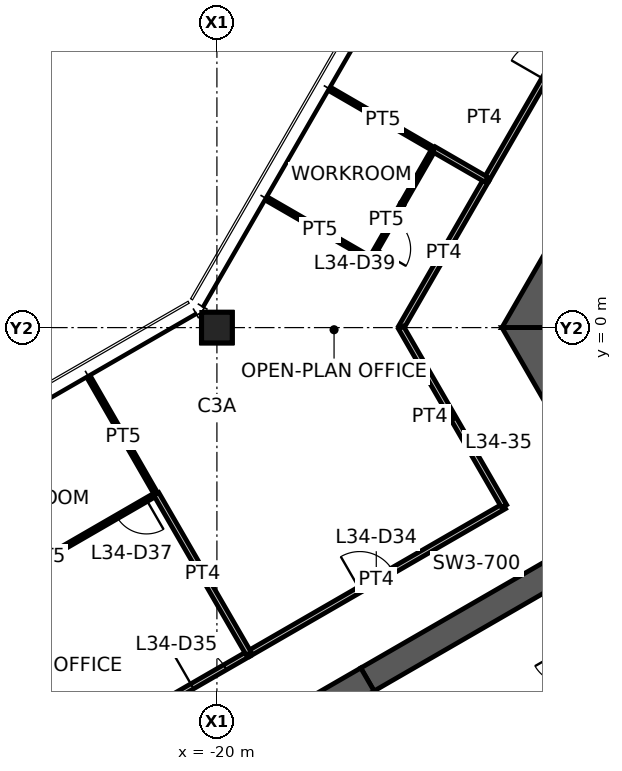
"""IFC4 building model, lengths in metres.
Left out: names, types, materials, properties, quantities, classifications, styles, units other than length and angle.
Written with IfcOpenShell. Run it as: python <this file> out.ifc"""

import sys

from ifc_helpers import new_model, si_unit, direction, frame, frame_2d, origin, origin_2d, place, context, subcontext, project, spatial, polyline, rectangle, hollow_rectangle, outline, extrude, element, fill, save


model = new_model("IFC4")
c1 = context("Model", 3, precision=1e-05, world=origin(), true_north=direction((0.0, 1.0)))
c2 = subcontext(c1, "Body", "Model", "MODEL_VIEW")
j1 = project(units=[si_unit("LENGTHUNIT", "METRE"), si_unit("PLANEANGLEUNIT", "RADIAN")], contexts=[c1])
p1 = place(None, origin())
s1 = spatial("IfcSite", under=j1, at=p1, CompositionType="ELEMENT")
p2 = place(p1, origin())
s2 = spatial("IfcBuilding", under=s1, at=p2, CompositionType="ELEMENT")
p3 = place(p2, frame((0.0, 0.0, 137.0)))
s3 = spatial("IfcBuildingStorey", under=s2, at=p3, CompositionType="ELEMENT", Elevation=137.0)
p4 = place(p3, frame((-20.0, 0.0, 0.0), z_axis=(0.0, 0.0, 1.0), x_axis=(1.0, 0.0, 0.0)))
e1 = element("IfcColumn", 1, at=p4, inside=s3, PredefinedType="COLUMN", context=c2, shape_type="SweptSolid", body=[
    extrude(hollow_rectangle(XDim=0.8, YDim=0.8, WallThickness=0.045, at=origin_2d()), origin(), (0.0, 0.0, 1.0), 3.9),
])
p5 = place(p3, frame((-5.961, 10.325, 0.0), z_axis=(0.0, 0.0, 1.0), x_axis=(-0.500004296715, -0.866022923061, 0.0)))
e2 = element("IfcWall", 2, at=p5, inside=s3, PredefinedType="SHEAR", context=c2, shape_type="SweptSolid", body=[
    extrude(outline(polyline([(-0.289, -0.5), (4.494, -0.5), (5.494, -0.5), (12.211, -0.5), (11.634, 0.5), (5.494, 0.5), (4.494, 0.5), (0.289, 0.5), (-0.289, -0.5)])), origin(), (0.0, 0.0, 1.0), 3.9),
])
p6 = place(p5, frame((4.494, 0.0, 0.0)))
e3 = element("IfcOpeningElement", 3, at=p6, cuts=e2, PredefinedType="OPENING", context=c2, shape_type="SweptSolid", body=[
    extrude(rectangle(XDim=1.0, YDim=2.1, at=frame_2d((0.5, 1.05))), frame((0.0, 0.51, 0.0), z_axis=(0.0, -1.0, 0.0), x_axis=(1.0, 0.0, 0.0)), (0.0, 0.0, 1.0), 1.02),
])
p7 = place(p3, frame((-11.922, 0.0, 0.0), z_axis=(0.0, 0.0, 1.0), x_axis=(0.500004296715, -0.866022923061, 0.0)))
e4 = element("IfcWall", 4, at=p7, inside=s3, PredefinedType="SHEAR", context=c2, shape_type="SweptSolid", body=[
    extrude(outline(polyline([(-0.289, -0.5), (6.331, -0.5), (7.131, -0.5), (12.211, -0.5), (11.634, 0.5), (7.131, 0.5), (6.331, 0.5), (0.289, 0.5), (-0.289, -0.5)])), origin(), (0.0, 0.0, 1.0), 3.9),
])
p8 = place(p7, frame((6.331, 0.0, 0.0)))
e5 = element("IfcOpeningElement", 5, at=p8, cuts=e4, PredefinedType="OPENING", context=c2, shape_type="SweptSolid", body=[
    extrude(rectangle(XDim=0.8, YDim=2.1, at=frame_2d((0.4, 1.05))), frame((0.0, 0.51, 0.0), z_axis=(0.0, -1.0, 0.0), x_axis=(1.0, 0.0, 0.0)), (0.0, 0.0, 1.0), 1.02),
])
p9 = place(p3, frame((-9.375, -5.413, 0.0), z_axis=(0.0, 0.0, 1.0), x_axis=(-0.866032377459, -0.499987921047, 0.0)))
e6 = element("IfcWall", 6, at=p9, inside=s3, PredefinedType="SHEAR", context=c2, shape_type="SweptSolid", body=[
    extrude(rectangle(XDim=7.696, YDim=0.7, at=frame_2d((3.848, 0.0))), origin(), (0.0, 0.0, 1.0), 3.9),
])
p10 = place(p9, frame((0.9, 0.0, 0.0)))
e7 = element("IfcOpeningElement", 7, at=p10, cuts=e6, PredefinedType="OPENING", context=c2, shape_type="SweptSolid", body=[
    extrude(rectangle(XDim=1.0, YDim=2.1, at=frame_2d((0.5, 1.05))), frame((0.0, 0.36, 0.0), z_axis=(0.0, -1.0, 0.0), x_axis=(1.0, 0.0, 0.0)), (0.0, 0.0, 1.0), 0.72),
])
p11 = place(p3, frame((-16.039, -9.26, 0.0), z_axis=(0.0, 0.0, 1.0), x_axis=(-0.866024837091, -0.50000098154, 0.0)))
e8 = element("IfcWall", 8, at=p11, inside=s3, PredefinedType="SHEAR", context=c2, shape_type="SweptSolid", body=[
    extrude(rectangle(XDim=13.0, YDim=0.7, at=frame_2d((6.5, 0.0))), origin(), (0.0, 0.0, 1.0), 3.9),
])
p12 = place(p3, frame((-19.171, -8.586, 0.0), z_axis=(0.0, 0.0, 1.0), x_axis=(0.866007176269, 0.500031569654, 0.0)))
e9 = element("IfcWall", 9, at=p12, inside=s3, PredefinedType="PARTITIONING", context=c2, shape_type="SweptSolid", body=[
    extrude(rectangle(XDim=7.771, YDim=0.15, at=frame_2d((3.885, 0.0))), origin(), (0.0, 0.0, 1.0), 2.95),
])
p13 = place(p12, frame((3.385, 0.0, 0.0)))
e10 = element("IfcOpeningElement", 10, at=p13, cuts=e9, PredefinedType="OPENING", context=c2, shape_type="SweptSolid", body=[
    extrude(rectangle(XDim=1.0, YDim=2.1, at=frame_2d((0.5, 1.05))), frame((0.0, 0.085, 0.0), z_axis=(0.0, -1.0, 0.0), x_axis=(1.0, 0.0, 0.0)), (0.0, 0.0, 1.0), 0.17),
])
p14 = place(p3, frame((-15.156, 0.0, 0.0), z_axis=(0.0, 0.0, 1.0), x_axis=(0.500014848696, 0.866016830716, 0.0)))
e11 = element("IfcWall", 11, at=p14, inside=s3, PredefinedType="PARTITIONING", context=c2, shape_type="SweptSolid", body=[
    extrude(rectangle(XDim=4.505, YDim=0.15, at=frame_2d((2.252, 0.0))), origin(), (0.0, 0.0, 1.0), 2.95),
])
p15 = place(p3, frame((-12.442, -4.7, 0.0), z_axis=(0.0, 0.0, 1.0), x_axis=(-0.500009286329, 0.866020042254, 0.0)))
e12 = element("IfcWall", 12, at=p15, inside=s3, PredefinedType="PARTITIONING", context=c2, shape_type="SweptSolid", body=[
    extrude(rectangle(XDim=5.428, YDim=0.15, at=frame_2d((2.714, 0.0))), origin(), (0.0, 0.0, 1.0), 2.95),
])
p16 = place(p3, frame((-21.271, -9.798, 0.0), z_axis=(0.0, 0.0, 1.0), x_axis=(0.866025270247, 0.500000231294, 0.0)))
e13 = element("IfcWall", 13, at=p16, inside=s3, PredefinedType="PARTITIONING", context=c2, shape_type="SweptSolid", body=[
    extrude(rectangle(XDim=2.435, YDim=0.15, at=frame_2d((1.217, 0.0))), origin(), (0.0, 0.0, 1.0), 2.95),
])
p17 = place(p16, frame((0.717, 0.0, 0.0)))
e14 = element("IfcOpeningElement", 14, at=p17, cuts=e13, PredefinedType="OPENING", context=c2, shape_type="SweptSolid", body=[
    extrude(rectangle(XDim=1.0, YDim=2.1, at=frame_2d((0.5, 1.05))), frame((0.0, 0.085, 0.0), z_axis=(0.0, -1.0, 0.0), x_axis=(1.0, 0.0, 0.0)), (0.0, 0.0, 1.0), 0.17),
])
p18 = place(p3, frame((-12.908, 3.893, 0.0), z_axis=(0.0, 0.0, 1.0), x_axis=(0.500006411147, 0.866021702275, 0.0)))
e15 = element("IfcWall", 15, at=p18, inside=s3, PredefinedType="PARTITIONING", context=c2, shape_type="SweptSolid", body=[
    extrude(rectangle(XDim=7.095, YDim=0.15, at=frame_2d((3.548, 0.0))), origin(), (0.0, 0.0, 1.0), 2.95),
])
p19 = place(p18, frame((3.047, 0.0, 0.0)))
e16 = element("IfcOpeningElement", 16, at=p19, cuts=e15, PredefinedType="OPENING", context=c2, shape_type="SweptSolid", body=[
    extrude(rectangle(XDim=1.0, YDim=2.1, at=frame_2d((0.5, 1.05))), frame((0.0, 0.085, 0.0), z_axis=(0.0, -1.0, 0.0), x_axis=(1.0, 0.0, 0.0)), (0.0, 0.0, 1.0), 0.17),
])
p20 = place(p3, frame((-23.332, -1.37, 0.0), z_axis=(0.0, 0.0, 1.0), x_axis=(0.498863855434, -0.86668036423, 0.0)))
e17 = element("IfcWall", 17, at=p20, inside=s3, PredefinedType="PARTITIONING", context=c2, shape_type="SweptSolid", body=[
    extrude(rectangle(XDim=3.48, YDim=0.1, at=frame_2d((1.74, 0.0))), origin(), (0.0, 0.0, 1.0), 2.95),
])
p21 = place(p3, frame((-21.594, -4.379, 0.0), z_axis=(0.0, 0.0, 1.0), x_axis=(-0.865682888643, -0.500592784916, 0.0)))
e18 = element("IfcWall", 18, at=p21, inside=s3, PredefinedType="PARTITIONING", context=c2, shape_type="SweptSolid", body=[
    extrude(rectangle(XDim=6.62, YDim=0.1, at=frame_2d((3.31, 0.0))), origin(), (0.0, 0.0, 1.0), 2.95),
])
p22 = place(p21, frame((0.3, 0.0, 0.0)))
e19 = element("IfcOpeningElement", 19, at=p22, cuts=e18, PredefinedType="OPENING", context=c2, shape_type="SweptSolid", body=[
    extrude(rectangle(XDim=0.9, YDim=2.1, at=frame_2d((0.45, 1.05))), frame((0.0, 0.06, 0.0), z_axis=(0.0, -1.0, 0.0), x_axis=(1.0, 0.0, 0.0)), (0.0, 0.0, 1.0), 0.12),
])
p23 = place(p3, frame((-15.952, 1.811, 0.0), z_axis=(0.0, 0.0, 1.0), x_axis=(-0.866029832698, 0.499992328818, 0.0)))
e20 = element("IfcWall", 20, at=p23, inside=s3, PredefinedType="PARTITIONING", context=c2, shape_type="SweptSolid", body=[
    extrude(rectangle(XDim=3.08, YDim=0.1, at=frame_2d((1.54, 0.0))), origin(), (0.0, 0.0, 1.0), 2.95),
])
p24 = place(p3, frame((-14.291, 4.698, 0.0), z_axis=(0.0, 0.0, 1.0), x_axis=(-0.498780940327, -0.866728085138, 0.0)))
e21 = element("IfcWall", 21, at=p24, inside=s3, PredefinedType="PARTITIONING", context=c2, shape_type="SweptSolid", body=[
    extrude(rectangle(XDim=3.331, YDim=0.1, at=frame_2d((1.666, 0.0))), origin(), (0.0, 0.0, 1.0), 2.95),
])
p25 = place(p24, frame((2.131, 0.0, 0.0)))
e22 = element("IfcOpeningElement", 22, at=p25, cuts=e21, PredefinedType="OPENING", context=c2, shape_type="SweptSolid", body=[
    extrude(rectangle(XDim=0.9, YDim=2.1, at=frame_2d((0.45, 1.05))), frame((0.0, 0.06, 0.0), z_axis=(0.0, -1.0, 0.0), x_axis=(1.0, 0.0, 0.0)), (0.0, 0.0, 1.0), 0.12),
])
p26 = place(p3, frame((-16.976, 6.248, 0.0), z_axis=(0.0, 0.0, 1.0), x_axis=(0.865232439327, -0.501370946442, 0.0)))
e23 = element("IfcWall", 23, at=p26, inside=s3, PredefinedType="PARTITIONING", context=c2, shape_type="SweptSolid", body=[
    extrude(rectangle(XDim=3.105, YDim=0.1, at=frame_2d((1.553, 0.0))), origin(), (0.0, 0.0, 1.0), 2.95),
])
p27 = place(p3, frame((-19.163, -8.581, 0.0), z_axis=(0.0, 0.0, 1.0), x_axis=(-0.500843945189, 0.865537603209, 0.0)))
e24 = element("IfcWall", 24, at=p27, inside=s3, PredefinedType="PARTITIONING", context=c2, shape_type="SweptSolid", body=[
    extrude(rectangle(XDim=4.854, YDim=0.15, at=frame_2d((2.427, 0.0))), origin(), (0.0, 0.0, 1.0), 2.95),
])
p28 = place(p3, frame((-14.289, 4.691, 0.0), z_axis=(0.0, 0.0, 1.0), x_axis=(0.865925490132, -0.500173015605, 0.0)))
e25 = element("IfcWall", 25, at=p28, inside=s3, PredefinedType="PARTITIONING", context=c2, shape_type="SweptSolid", body=[
    extrude(rectangle(XDim=1.595, YDim=0.15, at=frame_2d((0.797, 0.0))), origin(), (0.0, 0.0, 1.0), 2.95),
])
p29 = place(p13, origin())
e26 = element("IfcDoor", 26, at=p29, inside=s3, OperationType="SINGLE_SWING_LEFT", PredefinedType="DOOR", context=c2, shape_type="SweptSolid", body=[
    extrude(rectangle(XDim=1.0, YDim=2.1, at=frame_2d((0.5, 1.05))), frame((0.0, 0.025, 0.0), z_axis=(0.0, -1.0, 0.0), x_axis=(1.0, 0.0, 0.0)), (0.0, 0.0, 1.0), 0.05),
])
fill(e10, e26)
p30 = place(p17, origin())
e27 = element("IfcDoor", 27, at=p30, inside=s3, OperationType="SINGLE_SWING_LEFT", PredefinedType="DOOR", context=c2, shape_type="SweptSolid", body=[
    extrude(rectangle(XDim=1.0, YDim=2.1, at=frame_2d((0.5, 1.05))), frame((0.0, 0.025, 0.0), z_axis=(0.0, -1.0, 0.0), x_axis=(1.0, 0.0, 0.0)), (0.0, 0.0, 1.0), 0.05),
])
fill(e14, e27)
p31 = place(p22, origin())
e28 = element("IfcDoor", 28, at=p31, inside=s3, OperationType="SINGLE_SWING_LEFT", PredefinedType="DOOR", context=c2, shape_type="SweptSolid", body=[
    extrude(rectangle(XDim=0.9, YDim=2.1, at=frame_2d((0.45, 1.05))), frame((0.0, 0.025, 0.0), z_axis=(0.0, -1.0, 0.0), x_axis=(1.0, 0.0, 0.0)), (0.0, 0.0, 1.0), 0.05),
])
fill(e19, e28)
p32 = place(p25, origin())
e29 = element("IfcDoor", 29, at=p32, inside=s3, OperationType="SINGLE_SWING_RIGHT", PredefinedType="DOOR", context=c2, shape_type="SweptSolid", body=[
    extrude(rectangle(XDim=0.9, YDim=2.1, at=frame_2d((0.45, 1.05))), frame((0.0, 0.025, 0.0), z_axis=(0.0, -1.0, 0.0), x_axis=(1.0, 0.0, 0.0)), (0.0, 0.0, 1.0), 0.05),
])
fill(e22, e29)
save(model, sys.argv[1])
